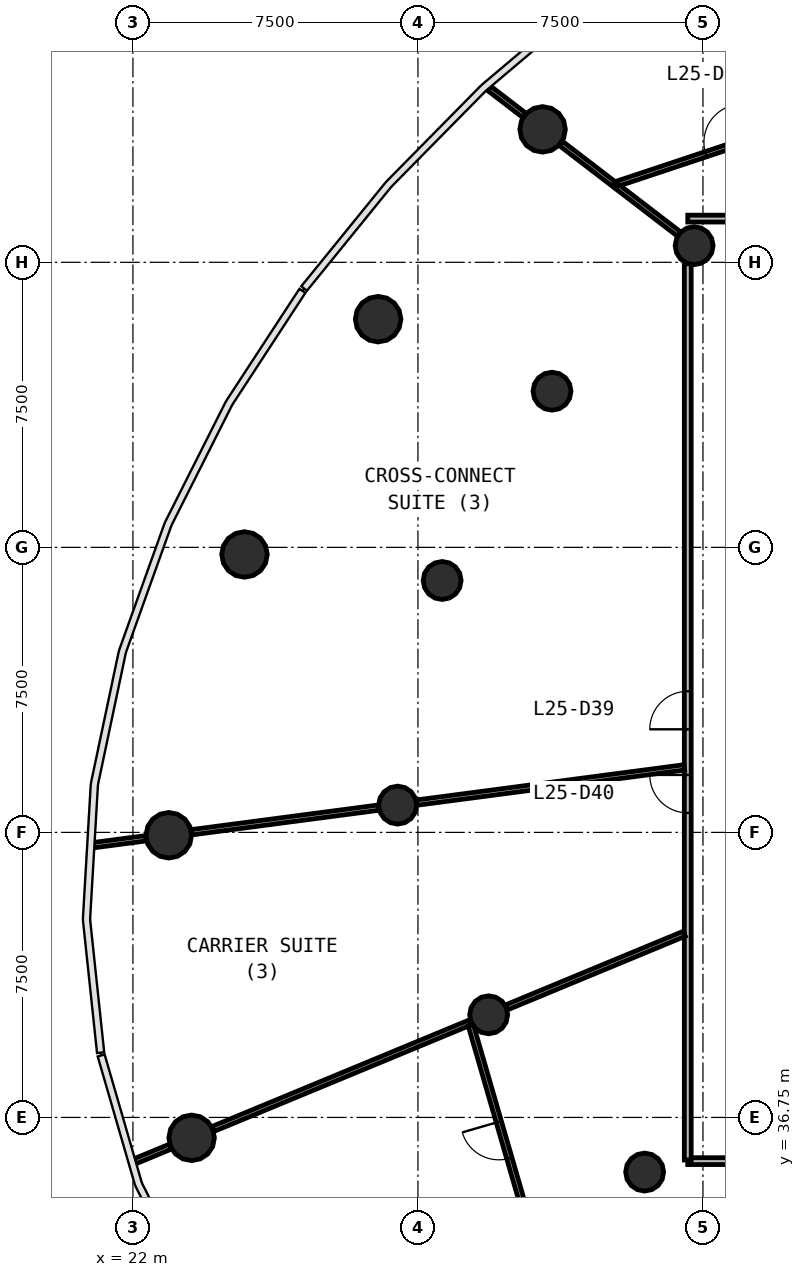
"""IFC4 building model, lengths in metres.
Left out: names, types, materials, properties, quantities, classifications, styles, units other than length and angle.
Written with IfcOpenShell. Run it as: python <this file> out.ifc"""

import sys

from ifc_helpers import new_model, si_unit, direction, frame, frame_2d, origin, origin_2d, place, context, subcontext, project, spatial, rectangle, circle, extrude, source, transform, mapped, element, fill, save


model = new_model("IFC4")
c1 = context("Model", 3, precision=1e-05, world=origin(), true_north=direction((0.0, 1.0)))
c2 = subcontext(c1, "Body", "Model", "MODEL_VIEW")
j1 = project(units=[si_unit("LENGTHUNIT", "METRE"), si_unit("PLANEANGLEUNIT", "RADIAN")], contexts=[c1])
p1 = place(None, origin())
s1 = spatial("IfcSite", under=j1, at=p1, CompositionType="ELEMENT")
p2 = place(p1, origin())
s2 = spatial("IfcBuilding", under=s1, at=p2, CompositionType="ELEMENT")
p3 = place(p2, frame((0.0, 0.0, 108.5)))
s3 = spatial("IfcBuildingStorey", under=s2, at=p3, CompositionType="ELEMENT", Elevation=108.5)
m1 = source(origin(), c2, "Body", "SweptSolid", [
    extrude(circle(Radius=0.6, at=origin_2d()), origin(), (0.0, 0.0, 1.0), 4.1),
])
for number, where, z_axis, x_axis in (
    (1, (32.78, 62.748, 0.0), (0.0, 0.0, 1.0), (1.0, 0.0, 0.0)),
    (2, (28.452, 57.754, 0.0), (0.0, 0.0, 1.0), (1.0, 0.0, 0.0)),
    (3, (24.936, 51.563, 0.0), (0.0, 0.0, 1.0), (1.0, 0.0, 0.0)),
    (4, (22.944, 44.175, 0.0), (0.0, 0.0, 1.0), (1.0, 0.0, 0.0)),
    (5, (23.544, 36.213, 0.0), (0.0, 0.0, 1.0), (1.0, 0.0, 0.0)),
):
    element("IfcColumn", number, at=place(p3, frame(where, z_axis=z_axis, x_axis=x_axis)), inside=s3, PredefinedType="COLUMN", context=c2, shape_type="MappedRepresentation", body=[
        mapped(m1, transform((0.0, 0.0, 0.0), scale=1.0)),
    ])
m2 = source(origin(), c2, "Body", "SweptSolid", [
    extrude(circle(Radius=0.5, at=origin_2d()), origin(), (0.0, 0.0, 1.0), 4.1),
])
for number, where, z_axis, x_axis in (
    (6, (36.768, 59.688, 0.0), (0.0, 0.0, 1.0), (1.0, 0.0, 0.0)),
    (7, (33.028, 55.859, 0.0), (0.0, 0.0, 1.0), (1.0, 0.0, 0.0)),
    (8, (30.137, 50.878, 0.0), (0.0, 0.0, 1.0), (1.0, 0.0, 0.0)),
    (9, (28.966, 44.968, 0.0), (0.0, 0.0, 1.0), (1.0, 0.0, 0.0)),
    (10, (31.361, 39.451, 0.0), (0.0, 0.0, 1.0), (1.0, 0.0, 0.0)),
    (11, (35.465, 35.312, 0.0), (0.0, 0.0, 1.0), (1.0, 0.0, 0.0)),
):
    element("IfcColumn", number, at=place(p3, frame(where, z_axis=z_axis, x_axis=x_axis)), inside=s3, PredefinedType="COLUMN", context=c2, shape_type="MappedRepresentation", body=[
        mapped(m2, transform((0.0, 0.0, 0.0), scale=1.0)),
    ])
p4 = place(p3, frame((67.4, 35.6, 0.0), z_axis=(0.0, 0.0, 1.0), x_axis=(-1.0, 0.0, 0.0)))
e12 = element("IfcWall", 12, at=p4, inside=s3, PredefinedType="PARTITIONING", context=c2, shape_type="SweptSolid", body=[
    extrude(rectangle(XDim=30.8, YDim=0.18, at=frame_2d((15.4, 0.0))), origin(), (0.0, 0.0, 1.0), 2.9),
])
p5 = place(p4, frame((9.05, 0.0, 0.0)))
e13 = element("IfcOpeningElement", 13, at=p5, cuts=e12, PredefinedType="OPENING", context=c2, shape_type="SweptSolid", body=[
    extrude(rectangle(XDim=0.9, YDim=2.1, at=frame_2d((0.45, 1.05))), frame((0.0, 0.1, 0.0), z_axis=(0.0, -1.0, 0.0), x_axis=(1.0, 0.0, 0.0)), (0.0, 0.0, 1.0), 0.2),
])
p6 = place(p4, frame((6.05, 0.0, 0.0)))
e14 = element("IfcOpeningElement", 14, at=p6, cuts=e12, PredefinedType="OPENING", context=c2, shape_type="SweptSolid", body=[
    extrude(rectangle(XDim=0.9, YDim=2.1, at=frame_2d((0.45, 1.05))), frame((0.0, 0.1, 0.0), z_axis=(0.0, -1.0, 0.0), x_axis=(1.0, 0.0, 0.0)), (0.0, 0.0, 1.0), 0.2),
])
p7 = place(p4, frame((2.45, 0.0, 0.0)))
e15 = element("IfcOpeningElement", 15, at=p7, cuts=e12, PredefinedType="OPENING", context=c2, shape_type="SweptSolid", body=[
    extrude(rectangle(XDim=0.9, YDim=2.1, at=frame_2d((0.45, 1.05))), frame((0.0, 0.1, 0.0), z_axis=(0.0, -1.0, 0.0), x_axis=(1.0, 0.0, 0.0)), (0.0, 0.0, 1.0), 0.2),
])
p8 = place(p4, frame((20.95, 0.0, 0.0)))
e16 = element("IfcOpeningElement", 16, at=p8, cuts=e12, PredefinedType="OPENING", context=c2, shape_type="SweptSolid", body=[
    extrude(rectangle(XDim=1.0, YDim=2.1, at=frame_2d((0.5, 1.05))), frame((0.0, 0.1, 0.0), z_axis=(0.0, -1.0, 0.0), x_axis=(1.0, 0.0, 0.0)), (0.0, 0.0, 1.0), 0.2),
])
p9 = place(p4, frame((14.95, 0.0, 0.0)))
e17 = element("IfcOpeningElement", 17, at=p9, cuts=e12, PredefinedType="OPENING", context=c2, shape_type="SweptSolid", body=[
    extrude(rectangle(XDim=1.0, YDim=2.1, at=frame_2d((0.5, 1.05))), frame((0.0, 0.1, 0.0), z_axis=(0.0, -1.0, 0.0), x_axis=(1.0, 0.0, 0.0)), (0.0, 0.0, 1.0), 0.2),
])
p10 = place(p4, frame((12.55, 0.0, 0.0)))
e18 = element("IfcOpeningElement", 18, at=p10, cuts=e12, PredefinedType="OPENING", context=c2, shape_type="SweptSolid", body=[
    extrude(rectangle(XDim=1.0, YDim=2.1, at=frame_2d((0.5, 1.05))), frame((0.0, 0.1, 0.0), z_axis=(0.0, -1.0, 0.0), x_axis=(1.0, 0.0, 0.0)), (0.0, 0.0, 1.0), 0.2),
])
p11 = place(p3, frame((36.6, 60.4, 0.0), z_axis=(0.0, 0.0, 1.0), x_axis=(1.0, 0.0, 0.0)))
e19 = element("IfcWall", 19, at=p11, inside=s3, PredefinedType="PARTITIONING", context=c2, shape_type="SweptSolid", body=[
    extrude(rectangle(XDim=30.8, YDim=0.18, at=frame_2d((15.4, 0.0))), origin(), (0.0, 0.0, 1.0), 2.9),
])
p12 = place(p11, frame((25.55, 0.0, 0.0)))
e20 = element("IfcOpeningElement", 20, at=p12, cuts=e19, PredefinedType="OPENING", context=c2, shape_type="SweptSolid", body=[
    extrude(rectangle(XDim=1.0, YDim=2.1, at=frame_2d((0.5, 1.05))), frame((0.0, 0.1, 0.0), z_axis=(0.0, -1.0, 0.0), x_axis=(1.0, 0.0, 0.0)), (0.0, 0.0, 1.0), 0.2),
])
p13 = place(p11, frame((20.95, 0.0, 0.0)))
e21 = element("IfcOpeningElement", 21, at=p13, cuts=e19, PredefinedType="OPENING", context=c2, shape_type="SweptSolid", body=[
    extrude(rectangle(XDim=1.0, YDim=2.1, at=frame_2d((0.5, 1.05))), frame((0.0, 0.1, 0.0), z_axis=(0.0, -1.0, 0.0), x_axis=(1.0, 0.0, 0.0)), (0.0, 0.0, 1.0), 0.2),
])
p14 = place(p11, frame((14.95, 0.0, 0.0)))
e22 = element("IfcOpeningElement", 22, at=p14, cuts=e19, PredefinedType="OPENING", context=c2, shape_type="SweptSolid", body=[
    extrude(rectangle(XDim=1.0, YDim=2.1, at=frame_2d((0.5, 1.05))), frame((0.0, 0.1, 0.0), z_axis=(0.0, -1.0, 0.0), x_axis=(1.0, 0.0, 0.0)), (0.0, 0.0, 1.0), 0.2),
])
p15 = place(p11, frame((8.95, 0.0, 0.0)))
e23 = element("IfcOpeningElement", 23, at=p15, cuts=e19, PredefinedType="OPENING", context=c2, shape_type="SweptSolid", body=[
    extrude(rectangle(XDim=1.0, YDim=2.1, at=frame_2d((0.5, 1.05))), frame((0.0, 0.1, 0.0), z_axis=(0.0, -1.0, 0.0), x_axis=(1.0, 0.0, 0.0)), (0.0, 0.0, 1.0), 0.2),
])
p16 = place(p3, frame((36.6, 35.63, 0.0), z_axis=(0.0, 0.0, 1.0), x_axis=(0.0, 1.0, 0.0)))
e24 = element("IfcWall", 24, at=p16, inside=s3, PredefinedType="PARTITIONING", context=c2, shape_type="SweptSolid", body=[
    extrude(rectangle(XDim=23.583, YDim=0.18, at=frame_2d((11.791, 0.0))), origin(), (0.0, 0.0, 1.0), 2.9),
])
p17 = place(p16, frame((11.333, 0.0, 0.0)))
e25 = element("IfcOpeningElement", 25, at=p17, cuts=e24, PredefinedType="OPENING", context=c2, shape_type="SweptSolid", body=[
    extrude(rectangle(XDim=1.0, YDim=2.1, at=frame_2d((0.5, 1.05))), frame((0.0, 0.1, 0.0), z_axis=(0.0, -1.0, 0.0), x_axis=(1.0, 0.0, 0.0)), (0.0, 0.0, 1.0), 0.2),
])
p18 = place(p16, frame((9.133, 0.0, 0.0)))
e26 = element("IfcOpeningElement", 26, at=p18, cuts=e24, PredefinedType="OPENING", context=c2, shape_type="SweptSolid", body=[
    extrude(rectangle(XDim=1.0, YDim=2.1, at=frame_2d((0.5, 1.05))), frame((0.0, 0.1, 0.0), z_axis=(0.0, -1.0, 0.0), x_axis=(1.0, 0.0, 0.0)), (0.0, 0.0, 1.0), 0.2),
])
p19 = place(p3, frame((30.87, 39.248, 0.0), z_axis=(0.0, 0.0, 1.0), x_axis=(-0.923871790576, -0.382702122514, 0.0)))
e27 = element("IfcWall", 27, at=p19, inside=s3, PredefinedType="PARTITIONING", context=c2, shape_type="SweptSolid", body=[
    extrude(rectangle(XDim=7.324, YDim=0.14, at=frame_2d((3.662, 0.0))), origin(), (0.0, 0.0, 1.0), 2.9),
])
p20 = place(p3, frame((36.51, 45.961, 0.0), z_axis=(0.0, 0.0, 1.0), x_axis=(-0.99144622305, -0.130515848849, 0.0)))
e28 = element("IfcWall", 28, at=p20, inside=s3, PredefinedType="PARTITIONING", context=c2, shape_type="SweptSolid", body=[
    extrude(rectangle(XDim=7.104, YDim=0.14, at=frame_2d((3.552, 0.0))), origin(), (0.0, 0.0, 1.0), 2.9),
])
p21 = place(p3, frame((32.631, 33.173, 0.0), z_axis=(0.0, 0.0, 1.0), x_axis=(-0.278343340878, 0.960481641984, 0.0)))
e29 = element("IfcWall", 29, at=p21, inside=s3, PredefinedType="PARTITIONING", context=c2, shape_type="SweptSolid", body=[
    extrude(rectangle(XDim=6.255, YDim=0.14, at=frame_2d((3.127, 0.0))), origin(), (0.0, 0.0, 1.0), 2.9),
])
p22 = place(p21, frame((2.604, 0.0, 0.0)))
e30 = element("IfcOpeningElement", 30, at=p22, cuts=e29, PredefinedType="OPENING", context=c2, shape_type="SweptSolid", body=[
    extrude(rectangle(XDim=1.0, YDim=2.1, at=frame_2d((0.5, 1.05))), frame((0.0, 0.08, 0.0), z_axis=(0.0, -1.0, 0.0), x_axis=(1.0, 0.0, 0.0)), (0.0, 0.0, 1.0), 0.16),
])
p23 = place(p3, frame((34.675, 61.294, 0.0), z_axis=(0.0, 0.0, 1.0), x_axis=(0.948817917671, 0.315823620247, 0.0)))
e31 = element("IfcWall", 31, at=p23, inside=s3, PredefinedType="PARTITIONING", context=c2, shape_type="SweptSolid", body=[
    extrude(rectangle(XDim=5.981, YDim=0.14, at=frame_2d((2.99, 0.0))), origin(), (0.0, 0.0, 1.0), 2.9),
])
p24 = place(p23, frame((2.531, 0.0, 0.0)))
e32 = element("IfcOpeningElement", 32, at=p24, cuts=e31, PredefinedType="OPENING", context=c2, shape_type="SweptSolid", body=[
    extrude(rectangle(XDim=1.0, YDim=2.1, at=frame_2d((0.5, 1.05))), frame((0.0, 0.08, 0.0), z_axis=(0.0, -1.0, 0.0), x_axis=(1.0, 0.0, 0.0)), (0.0, 0.0, 1.0), 0.16),
])
p25 = place(p3, frame((36.51, 41.584, 0.0), z_axis=(0.0, 0.0, 1.0), x_axis=(-0.923890025086, -0.382658100067, 0.0)))
e33 = element("IfcWall", 33, at=p25, inside=s3, PredefinedType="PARTITIONING", context=c2, shape_type="SweptSolid", body=[
    extrude(rectangle(XDim=5.068, YDim=0.14, at=frame_2d((2.534, 0.0))), origin(), (0.0, 0.0, 1.0), 2.9),
])
p26 = place(p3, frame((28.466, 44.902, 0.0), z_axis=(0.0, 0.0, 1.0), x_axis=(-0.991443414541, -0.130537181533, 0.0)))
e34 = element("IfcWall", 34, at=p26, inside=s3, PredefinedType="PARTITIONING", context=c2, shape_type="SweptSolid", body=[
    extrude(rectangle(XDim=4.966, YDim=0.14, at=frame_2d((2.483, 0.0))), origin(), (0.0, 0.0, 1.0), 2.9),
])
p27 = place(p3, frame((36.367, 59.995, 0.0), z_axis=(0.0, 0.0, 1.0), x_axis=(-0.793389614633, 0.608714152449, 0.0)))
e35 = element("IfcWall", 35, at=p27, inside=s3, PredefinedType="PARTITIONING", context=c2, shape_type="SweptSolid", body=[
    extrude(rectangle(XDim=2.049, YDim=0.14, at=frame_2d((1.024, 0.0))), origin(), (0.0, 0.0, 1.0), 2.9),
])
p28 = place(p3, frame((34.651, 61.312, 0.0), z_axis=(0.0, 0.0, 1.0), x_axis=(-0.793368751306, 0.608741344456, 0.0)))
e36 = element("IfcWall", 36, at=p28, inside=s3, PredefinedType="PARTITIONING", context=c2, shape_type="SweptSolid", body=[
    extrude(rectangle(XDim=1.753, YDim=0.14, at=frame_2d((0.877, 0.0))), origin(), (0.0, 0.0, 1.0), 2.9),
])
p29 = place(p3, frame((22.344, 44.096, 0.0), z_axis=(0.0, 0.0, 1.0), x_axis=(-0.991440859851, -0.130556583206, 0.0)))
e37 = element("IfcWall", 37, at=p29, inside=s3, PredefinedType="PARTITIONING", context=c2, shape_type="SweptSolid", body=[
    extrude(rectangle(XDim=1.423, YDim=0.14, at=frame_2d((0.711, 0.0))), origin(), (0.0, 0.0, 1.0), 2.9),
])
p30 = place(p3, frame((32.301, 63.116, 0.0), z_axis=(0.0, 0.0, 1.0), x_axis=(-0.793332880396, 0.608788091935, 0.0)))
e38 = element("IfcWall", 38, at=p30, inside=s3, PredefinedType="PARTITIONING", context=c2, shape_type="SweptSolid", body=[
    extrude(rectangle(XDim=1.164, YDim=0.14, at=frame_2d((0.582, 0.0))), origin(), (0.0, 0.0, 1.0), 2.9),
])
p31 = place(p3, frame((22.986, 35.982, 0.0), z_axis=(0.0, 0.0, 1.0), x_axis=(-0.923909071339, -0.38261211154, 0.0)))
e39 = element("IfcWall", 39, at=p31, inside=s3, PredefinedType="PARTITIONING", context=c2, shape_type="SweptSolid", body=[
    extrude(rectangle(XDim=1.021, YDim=0.14, at=frame_2d((0.511, 0.0))), origin(), (0.0, 0.0, 1.0), 2.9),
])
m3 = source(origin(), c2, "Body", "SweptSolid", [
    extrude(rectangle(XDim=1.0, YDim=2.1, at=frame_2d((0.5, 1.05))), frame((0.0, 0.025, 0.0), z_axis=(0.0, -1.0, 0.0), x_axis=(1.0, 0.0, 0.0)), (0.0, 0.0, 1.0), 0.05),
])
p32 = place(p24, origin())
e40 = element("IfcDoor", 40, at=p32, inside=s3, OperationType="SINGLE_SWING_RIGHT", PredefinedType="DOOR", context=c2, shape_type="MappedRepresentation", body=[
    mapped(m3, transform((0.0, 0.0, 0.0), scale=1.0)),
])
fill(e32, e40)
p33 = place(p17, origin())
e41 = element("IfcDoor", 41, at=p33, inside=s3, OperationType="SINGLE_SWING_LEFT", PredefinedType="DOOR", context=c2, shape_type="MappedRepresentation", body=[
    mapped(m3, transform((0.0, 0.0, 0.0), scale=1.0)),
])
fill(e25, e41)
p34 = place(p18, origin())
e42 = element("IfcDoor", 42, at=p34, inside=s3, OperationType="SINGLE_SWING_RIGHT", PredefinedType="DOOR", context=c2, shape_type="MappedRepresentation", body=[
    mapped(m3, transform((0.0, 0.0, 0.0), scale=1.0)),
])
fill(e26, e42)
p35 = place(p22, origin())
e43 = element("IfcDoor", 43, at=p35, inside=s3, OperationType="SINGLE_SWING_RIGHT", PredefinedType="DOOR", context=c2, shape_type="MappedRepresentation", body=[
    mapped(m3, transform((0.0, 0.0, 0.0), scale=1.0)),
])
fill(e30, e43)
save(model, sys.argv[1])
